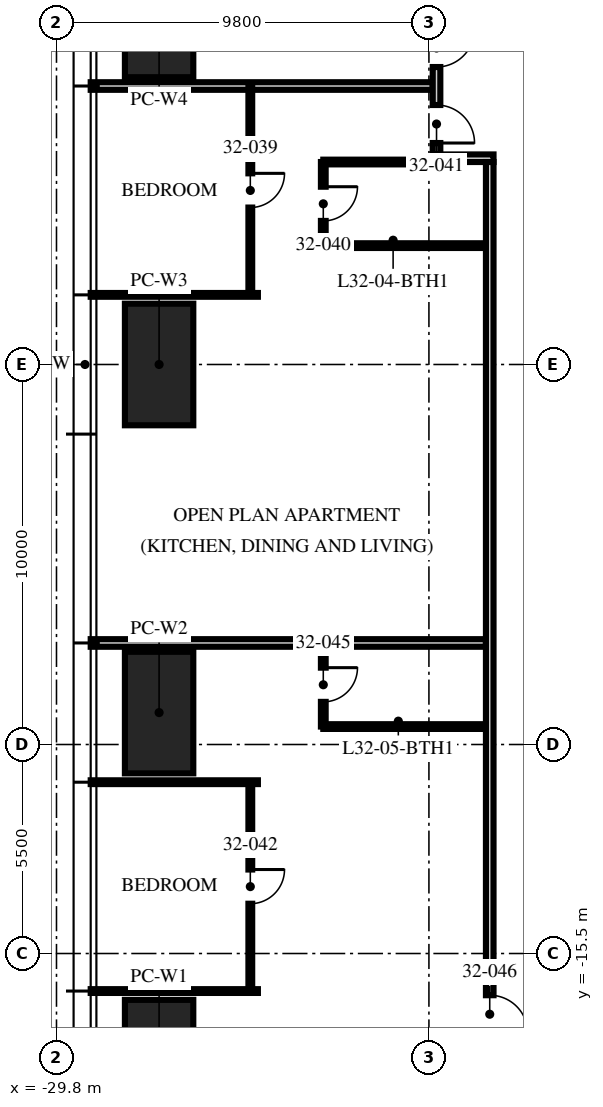
"""IFC4 building model, lengths in metres.
Left out: names, types, materials, properties, quantities, classifications, styles, units other than length and angle.
Written with IfcOpenShell. Run it as: python <this file> out.ifc"""

import sys

from ifc_helpers import new_model, si_unit, direction, frame, frame_2d, origin, origin_2d, place, context, subcontext, project, spatial, rectangle, extrude, element, fill, save


model = new_model("IFC4")
c1 = context("Model", 3, precision=1e-05, world=origin(), true_north=direction((0.0, 1.0)))
c2 = subcontext(c1, "Body", "Model", "MODEL_VIEW")
j1 = project(units=[si_unit("LENGTHUNIT", "METRE"), si_unit("PLANEANGLEUNIT", "RADIAN")], contexts=[c1])
p1 = place(None, origin())
s1 = spatial("IfcSite", under=j1, at=p1, CompositionType="ELEMENT")
p2 = place(p1, origin())
s2 = spatial("IfcBuilding", under=s1, at=p2, CompositionType="ELEMENT")
p3 = place(p2, frame((0.0, 0.0, 129.75)))
s3 = spatial("IfcBuildingStorey", under=s2, at=p3, CompositionType="ELEMENT", Elevation=129.75)
for number, where, z_axis, x_axis in (
    (1, (-27.1, -18.32, 0.0), (0.0, 0.0, 1.0), (0.0, 1.0, 0.0)),
    (2, (-27.1, -9.16, 0.0), (0.0, 0.0, 1.0), (0.0, 1.0, 0.0)),
    (3, (-27.1, 0.0, 0.0), (0.0, 0.0, 1.0), (0.0, 1.0, 0.0)),
    (4, (-27.1, 9.16, 0.0), (0.0, 0.0, 1.0), (0.0, 1.0, 0.0)),
):
    element("IfcColumn", number, at=place(p3, frame(where, z_axis=z_axis, x_axis=x_axis)), inside=s3, PredefinedType="COLUMN", context=c2, shape_type="SweptSolid", body=[
        extrude(rectangle(XDim=3.2, YDim=1.8, at=origin_2d()), origin(), (0.0, 0.0, 1.0), 3.75),
    ])
p4 = place(p3, frame((-19.9, 7.328, 0.0), z_axis=(0.0, 0.0, 1.0), x_axis=(-1.0, 0.0, 0.0)))
e5 = element("IfcWall", 5, at=p4, inside=s3, PredefinedType="PARTITIONING", context=c2, shape_type="SweptSolid", body=[
    extrude(rectangle(XDim=9.0, YDim=0.2, at=frame_2d((4.5, 0.0))), origin(), (0.0, 0.0, 1.0), 2.81),
])
p5 = place(p3, frame((-24.5, 1.832, 0.0), z_axis=(0.0, 0.0, 1.0), x_axis=(-1.0, 0.0, 0.0)))
e6 = element("IfcWall", 6, at=p5, inside=s3, PredefinedType="PARTITIONING", context=c2, shape_type="SweptSolid", body=[
    extrude(rectangle(XDim=4.4, YDim=0.1, at=frame_2d((2.2, 0.0))), origin(), (0.0, 0.0, 1.0), 2.81),
])
p6 = place(p3, frame((-18.5, -7.328, 0.0), z_axis=(0.0, 0.0, 1.0), x_axis=(-1.0, 0.0, 0.0)))
e7 = element("IfcWall", 7, at=p6, inside=s3, PredefinedType="PARTITIONING", context=c2, shape_type="SweptSolid", body=[
    extrude(rectangle(XDim=10.4, YDim=0.2, at=frame_2d((5.2, 0.0))), origin(), (0.0, 0.0, 1.0), 2.81),
])
for number, where, z_axis, x_axis in (
    (8, (-24.5, -10.992, 0.0), (0.0, 0.0, 1.0), (-1.0, 0.0, 0.0)),
    (9, (-24.5, -16.488, 0.0), (0.0, 0.0, 1.0), (-1.0, 0.0, 0.0)),
):
    element("IfcWall", number, at=place(p3, frame(where, z_axis=z_axis, x_axis=x_axis)), inside=s3, PredefinedType="PARTITIONING", context=c2, shape_type="SweptSolid", body=[
        extrude(rectangle(XDim=4.4, YDim=0.1, at=frame_2d((2.2, 0.0))), origin(), (0.0, 0.0, 1.0), 2.81),
    ])
p7 = place(p3, frame((-24.7, 7.328, 0.0), z_axis=(0.0, 0.0, 1.0), x_axis=(0.0, -1.0, 0.0)))
e10 = element("IfcWall", 10, at=p7, inside=s3, PredefinedType="PARTITIONING", context=c2, shape_type="SweptSolid", body=[
    extrude(rectangle(XDim=5.496, YDim=0.1, at=frame_2d((2.748, 0.0))), origin(), (0.0, 0.0, 1.0), 2.81),
])
p8 = place(p7, frame((2.298, 0.0, 0.0)))
e11 = element("IfcOpeningElement", 11, at=p8, cuts=e10, PredefinedType="OPENING", context=c2, shape_type="SweptSolid", body=[
    extrude(rectangle(XDim=0.9, YDim=2.1, at=frame_2d((0.45, 1.05))), frame((0.0, 0.06, 0.0), z_axis=(0.0, -1.0, 0.0), x_axis=(1.0, 0.0, 0.0)), (0.0, 0.0, 1.0), 0.12),
])
p9 = place(p3, frame((-22.78, 5.328, 0.0), z_axis=(0.0, 0.0, 1.0), x_axis=(0.0, -1.0, 0.0)))
e12 = element("IfcWall", 12, at=p9, inside=s3, PredefinedType="PARTITIONING", context=c2, shape_type="SweptSolid", body=[
    extrude(rectangle(XDim=2.2, YDim=0.125, at=frame_2d((1.1, 0.0))), origin(), (0.0, 0.0, 1.0), 2.81),
])
p10 = place(p9, frame((0.65, 0.0, 0.0)))
e13 = element("IfcOpeningElement", 13, at=p10, cuts=e12, PredefinedType="OPENING", context=c2, shape_type="SweptSolid", body=[
    extrude(rectangle(XDim=0.9, YDim=2.1, at=frame_2d((0.45, 1.05))), frame((0.0, 0.073, 0.0), z_axis=(0.0, -1.0, 0.0), x_axis=(1.0, 0.0, 0.0)), (0.0, 0.0, 1.0), 0.145),
])
p11 = place(p3, frame((-19.97, 5.328, 0.0), z_axis=(0.0, 0.0, 1.0), x_axis=(-1.0, 0.0, 0.0)))
e14 = element("IfcWall", 14, at=p11, inside=s3, PredefinedType="PARTITIONING", context=c2, shape_type="SweptSolid", body=[
    extrude(rectangle(XDim=2.81, YDim=0.125, at=frame_2d((1.405, 0.0))), origin(), (0.0, 0.0, 1.0), 3.5),
])
p12 = place(p3, frame((-18.5, 3.128, 0.0), z_axis=(0.0, 0.0, 1.0), x_axis=(-1.0, 0.0, 0.0)))
e15 = element("IfcWall", 15, at=p12, inside=s3, PredefinedType="PARTITIONING", context=c2, shape_type="SweptSolid", body=[
    extrude(rectangle(XDim=4.28, YDim=0.125, at=frame_2d((2.14, 0.0))), origin(), (0.0, 0.0, 1.0), 3.5),
])
p13 = place(p3, frame((-24.7, -10.992, 0.0), z_axis=(0.0, 0.0, 1.0), x_axis=(0.0, -1.0, 0.0)))
e16 = element("IfcWall", 16, at=p13, inside=s3, PredefinedType="PARTITIONING", context=c2, shape_type="SweptSolid", body=[
    extrude(rectangle(XDim=5.496, YDim=0.1, at=frame_2d((2.748, 0.0))), origin(), (0.0, 0.0, 1.0), 2.81),
])
p14 = place(p13, frame((2.298, 0.0, 0.0)))
e17 = element("IfcOpeningElement", 17, at=p14, cuts=e16, PredefinedType="OPENING", context=c2, shape_type="SweptSolid", body=[
    extrude(rectangle(XDim=0.9, YDim=2.1, at=frame_2d((0.45, 1.05))), frame((0.0, 0.06, 0.0), z_axis=(0.0, -1.0, 0.0), x_axis=(1.0, 0.0, 0.0)), (0.0, 0.0, 1.0), 0.12),
])
p15 = place(p3, frame((-22.78, -7.328, 0.0), z_axis=(0.0, 0.0, 1.0), x_axis=(0.0, -1.0, 0.0)))
e18 = element("IfcWall", 18, at=p15, inside=s3, PredefinedType="PARTITIONING", context=c2, shape_type="SweptSolid", body=[
    extrude(rectangle(XDim=2.2, YDim=0.125, at=frame_2d((1.1, 0.0))), origin(), (0.0, 0.0, 1.0), 2.7),
])
p16 = place(p15, frame((0.65, 0.0, 0.0)))
e19 = element("IfcOpeningElement", 19, at=p16, cuts=e18, PredefinedType="OPENING", context=c2, shape_type="SweptSolid", body=[
    extrude(rectangle(XDim=0.9, YDim=2.1, at=frame_2d((0.45, 1.05))), frame((0.0, 0.073, 0.0), z_axis=(0.0, -1.0, 0.0), x_axis=(1.0, 0.0, 0.0)), (0.0, 0.0, 1.0), 0.145),
])
p17 = place(p3, frame((-18.5, -9.528, 0.0), z_axis=(0.0, 0.0, 1.0), x_axis=(-1.0, 0.0, 0.0)))
e20 = element("IfcWall", 20, at=p17, inside=s3, PredefinedType="PARTITIONING", context=c2, shape_type="SweptSolid", body=[
    extrude(rectangle(XDim=4.28, YDim=0.125, at=frame_2d((2.14, 0.0))), origin(), (0.0, 0.0, 1.0), 3.5),
])
p18 = place(p3, frame((-18.3, 5.428, 0.0), z_axis=(0.0, 0.0, 1.0), x_axis=(-1.0, 0.0, 0.0)))
e21 = element("IfcWall", 21, at=p18, inside=s3, PredefinedType="PARTITIONING", context=c2, shape_type="SweptSolid", body=[
    extrude(rectangle(XDim=1.6, YDim=0.2, at=frame_2d((0.8, 0.0))), origin(), (0.0, 0.0, 1.0), 3.5),
])
p19 = place(p3, frame((-19.8, 9.128, 0.0), z_axis=(0.0, 0.0, 1.0), x_axis=(0.0, -1.0, 0.0)))
e22 = element("IfcWall", 22, at=p19, inside=s3, PredefinedType="PARTITIONING", context=c2, shape_type="SweptSolid", body=[
    extrude(rectangle(XDim=3.6, YDim=0.2, at=frame_2d((1.8, 0.0))), origin(), (0.0, 0.0, 1.0), 2.7),
])
p20 = place(p19, frame((0.3, 0.0, 0.0)))
e23 = element("IfcOpeningElement", 23, at=p20, cuts=e22, PredefinedType="OPENING", context=c2, shape_type="SweptSolid", body=[
    extrude(rectangle(XDim=1.0, YDim=2.2, at=frame_2d((0.5, 1.1))), frame((0.0, 0.11, 0.0), z_axis=(0.0, -1.0, 0.0), x_axis=(1.0, 0.0, 0.0)), (0.0, 0.0, 1.0), 0.22),
])
p21 = place(p19, frame((2.3, 0.0, 0.0)))
e24 = element("IfcOpeningElement", 24, at=p21, cuts=e22, PredefinedType="OPENING", context=c2, shape_type="SweptSolid", body=[
    extrude(rectangle(XDim=1.0, YDim=2.2, at=frame_2d((0.5, 1.1))), frame((0.0, 0.11, 0.0), z_axis=(0.0, -1.0, 0.0), x_axis=(1.0, 0.0, 0.0)), (0.0, 0.0, 1.0), 0.22),
])
p22 = place(p3, frame((-18.4, 5.328, 0.0), z_axis=(0.0, 0.0, 1.0), x_axis=(0.0, -1.0, 0.0)))
e25 = element("IfcWall", 25, at=p22, inside=s3, PredefinedType="PARTITIONING", context=c2, shape_type="SweptSolid", body=[
    extrude(rectangle(XDim=23.628, YDim=0.2, at=frame_2d((11.814, 0.0))), origin(), (0.0, 0.0, 1.0), 2.3),
])
p23 = place(p22, frame((21.926, 0.0, 0.0)))
e26 = element("IfcOpeningElement", 26, at=p23, cuts=e25, PredefinedType="OPENING", context=c2, shape_type="SweptSolid", body=[
    extrude(rectangle(XDim=1.0, YDim=2.2, at=frame_2d((0.5, 1.1))), frame((0.0, 0.11, 0.0), z_axis=(0.0, -1.0, 0.0), x_axis=(1.0, 0.0, 0.0)), (0.0, 0.0, 1.0), 0.22),
])
p24 = place(p20, origin())
e27 = element("IfcDoor", 27, at=p24, inside=s3, OperationType="SINGLE_SWING_LEFT", PredefinedType="DOOR", context=c2, shape_type="SweptSolid", body=[
    extrude(rectangle(XDim=1.0, YDim=2.2, at=frame_2d((0.5, 1.1))), frame((0.0, 0.025, 0.0), z_axis=(0.0, -1.0, 0.0), x_axis=(1.0, 0.0, 0.0)), (0.0, 0.0, 1.0), 0.05),
])
fill(e23, e27)
p25 = place(p8, origin())
e28 = element("IfcDoor", 28, at=p25, inside=s3, OperationType="SINGLE_SWING_LEFT", PredefinedType="DOOR", context=c2, shape_type="SweptSolid", body=[
    extrude(rectangle(XDim=0.9, YDim=2.1, at=frame_2d((0.45, 1.05))), frame((0.0, 0.025, 0.0), z_axis=(0.0, -1.0, 0.0), x_axis=(1.0, 0.0, 0.0)), (0.0, 0.0, 1.0), 0.05),
])
fill(e11, e28)
p26 = place(p10, origin())
e29 = element("IfcDoor", 29, at=p26, inside=s3, OperationType="SINGLE_SWING_LEFT", PredefinedType="DOOR", context=c2, shape_type="SweptSolid", body=[
    extrude(rectangle(XDim=0.9, YDim=2.1, at=frame_2d((0.45, 1.05))), frame((0.0, 0.025, 0.0), z_axis=(0.0, -1.0, 0.0), x_axis=(1.0, 0.0, 0.0)), (0.0, 0.0, 1.0), 0.05),
])
fill(e13, e29)
p27 = place(p21, origin())
e30 = element("IfcDoor", 30, at=p27, inside=s3, OperationType="SINGLE_SWING_RIGHT", PredefinedType="DOOR", context=c2, shape_type="SweptSolid", body=[
    extrude(rectangle(XDim=1.0, YDim=2.2, at=frame_2d((0.5, 1.1))), frame((0.0, 0.025, 0.0), z_axis=(0.0, -1.0, 0.0), x_axis=(1.0, 0.0, 0.0)), (0.0, 0.0, 1.0), 0.05),
])
fill(e24, e30)
p28 = place(p14, origin())
e31 = element("IfcDoor", 31, at=p28, inside=s3, OperationType="SINGLE_SWING_LEFT", PredefinedType="DOOR", context=c2, shape_type="SweptSolid", body=[
    extrude(rectangle(XDim=0.9, YDim=2.1, at=frame_2d((0.45, 1.05))), frame((0.0, 0.025, 0.0), z_axis=(0.0, -1.0, 0.0), x_axis=(1.0, 0.0, 0.0)), (0.0, 0.0, 1.0), 0.05),
])
fill(e17, e31)
p29 = place(p16, origin())
e32 = element("IfcDoor", 32, at=p29, inside=s3, OperationType="SINGLE_SWING_LEFT", PredefinedType="DOOR", context=c2, shape_type="SweptSolid", body=[
    extrude(rectangle(XDim=0.9, YDim=2.1, at=frame_2d((0.45, 1.05))), frame((0.0, 0.025, 0.0), z_axis=(0.0, -1.0, 0.0), x_axis=(1.0, 0.0, 0.0)), (0.0, 0.0, 1.0), 0.05),
])
fill(e19, e32)
p30 = place(p23, origin())
e33 = element("IfcDoor", 33, at=p30, inside=s3, OperationType="SINGLE_SWING_RIGHT", PredefinedType="DOOR", context=c2, shape_type="SweptSolid", body=[
    extrude(rectangle(XDim=1.0, YDim=2.2, at=frame_2d((0.5, 1.1))), frame((0.0, 0.025, 0.0), z_axis=(0.0, -1.0, 0.0), x_axis=(1.0, 0.0, 0.0)), (0.0, 0.0, 1.0), 0.05),
])
fill(e26, e33)
save(model, sys.argv[1])
